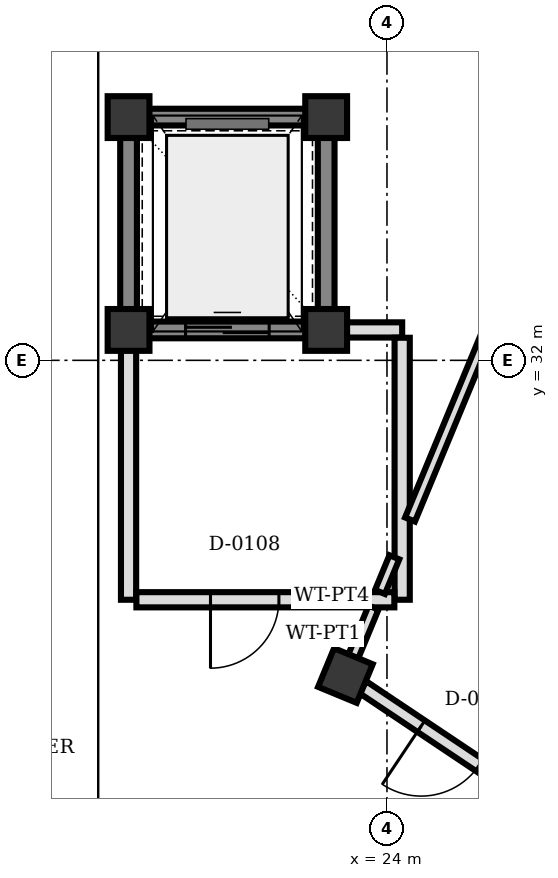
"""IFC4 building model, lengths in metres.
Left out: names, types, materials, properties, quantities, classifications, styles, units other than length and angle.
Written with IfcOpenShell. Run it as: python <this file> out.ifc"""

import sys

from ifc_helpers import new_model, si_unit, direction, frame, frame_2d, origin, origin_2d, place, context, subcontext, project, spatial, rectangle, extrude, element, fill, save


model = new_model("IFC4")
c1 = context("Model", 3, precision=1e-05, world=origin(), true_north=direction((0.0, 1.0)))
c2 = subcontext(c1, "Body", "Model", "MODEL_VIEW")
j1 = project(units=[si_unit("LENGTHUNIT", "METRE"), si_unit("PLANEANGLEUNIT", "RADIAN")], contexts=[c1])
p1 = place(None, origin())
s1 = spatial("IfcSite", under=j1, at=p1, CompositionType="ELEMENT")
p2 = place(p1, origin())
s2 = spatial("IfcBuilding", under=s1, at=p2, CompositionType="ELEMENT")
p3 = place(p2, frame((0.0, 0.0, 12.5)))
s3 = spatial("IfcBuildingStorey", under=s2, at=p3, CompositionType="ELEMENT", Elevation=12.5)
for number, where, z_axis, x_axis in (
    (1, (20.6, 32.4, 0.0), (0.0, 0.0, 1.0), (1.0, 0.0, 0.0)),
    (2, (23.2, 32.4, 0.0), (0.0, 0.0, 1.0), (1.0, 0.0, 0.0)),
    (3, (23.2, 35.2, 0.0), (0.0, 0.0, 1.0), (1.0, 0.0, 0.0)),
    (4, (20.6, 35.2, 0.0), (0.0, 0.0, 1.0), (1.0, 0.0, 0.0)),
):
    element("IfcColumn", number, at=place(p3, frame(where, z_axis=z_axis, x_axis=x_axis)), inside=s3, PredefinedType="COLUMN", context=c2, shape_type="SweptSolid", body=[
        extrude(rectangle(XDim=0.55, YDim=0.55, at=origin_2d()), origin(), (0.0, 0.0, 1.0), 4.0),
    ])
p4 = place(p3, frame((23.453, 27.853, 0.0), z_axis=(0.0, 0.0, 1.0), x_axis=(0.382683432365, 0.923879532511, 0.0)))
e5 = element("IfcColumn", 5, at=p4, inside=s3, PredefinedType="COLUMN", context=c2, shape_type="SweptSolid", body=[
    extrude(rectangle(XDim=0.55, YDim=0.55, at=origin_2d()), origin(), (0.0, 0.0, 1.0), 4.59),
])
p5 = place(p3, frame((20.867, 32.4, 0.0), z_axis=(0.0, 0.0, 1.0), x_axis=(1.0, 0.0, 0.0)))
e6 = element("IfcWall", 6, at=p5, inside=s3, PredefinedType="SHEAR", context=c2, shape_type="SweptSolid", body=[
    extrude(rectangle(XDim=2.066, YDim=0.22, at=frame_2d((1.033, 0.0))), origin(), (0.0, 0.0, 1.0), 3.74),
])
p6 = place(p5, frame((0.483, 0.0, 0.0)))
e7 = element("IfcOpeningElement", 7, at=p6, cuts=e6, PredefinedType="OPENING", context=c2, shape_type="SweptSolid", body=[
    extrude(rectangle(XDim=1.1, YDim=2.15, at=frame_2d((0.55, 1.075))), frame((0.0, 0.12, 0.0), z_axis=(0.0, -1.0, 0.0), x_axis=(1.0, 0.0, 0.0)), (0.0, 0.0, 1.0), 0.24),
])
p7 = place(p3, frame((23.2, 32.667, 0.0), z_axis=(0.0, 0.0, 1.0), x_axis=(0.0, 1.0, 0.0)))
e8 = element("IfcWall", 8, at=p7, inside=s3, PredefinedType="SHEAR", context=c2, shape_type="SweptSolid", body=[
    extrude(rectangle(XDim=2.266, YDim=0.22, at=frame_2d((1.133, 0.0))), origin(), (0.0, 0.0, 1.0), 3.74),
])
p8 = place(p3, frame((22.933, 35.2, 0.0), z_axis=(0.0, 0.0, 1.0), x_axis=(-1.0, 0.0, 0.0)))
e9 = element("IfcWall", 9, at=p8, inside=s3, PredefinedType="SHEAR", context=c2, shape_type="SweptSolid", body=[
    extrude(rectangle(XDim=2.066, YDim=0.22, at=frame_2d((1.033, 0.0))), origin(), (0.0, 0.0, 1.0), 3.74),
])
p9 = place(p3, frame((20.6, 34.933, 0.0), z_axis=(0.0, 0.0, 1.0), x_axis=(0.0, -1.0, 0.0)))
e10 = element("IfcWall", 10, at=p9, inside=s3, PredefinedType="SHEAR", context=c2, shape_type="SweptSolid", body=[
    extrude(rectangle(XDim=2.266, YDim=0.22, at=frame_2d((1.133, 0.0))), origin(), (0.0, 0.0, 1.0), 3.74),
])
p10 = place(p3, frame((23.467, 32.4, 0.0), z_axis=(0.0, 0.0, 1.0), x_axis=(1.0, 0.0, 0.0)))
e11 = element("IfcWall", 11, at=p10, inside=s3, PredefinedType="PARTITIONING", context=c2, shape_type="SweptSolid", body=[
    extrude(rectangle(XDim=0.733, YDim=0.2, at=frame_2d((0.366, 0.0))), origin(), (0.0, 0.0, 1.0), 3.7),
])
p11 = place(p3, frame((20.6, 28.85, 0.0), z_axis=(0.0, 0.0, 1.0), x_axis=(0.0, 1.0, 0.0)))
e12 = element("IfcWall", 12, at=p11, inside=s3, PredefinedType="PARTITIONING", context=c2, shape_type="SweptSolid", body=[
    extrude(rectangle(XDim=3.283, YDim=0.2, at=frame_2d((1.642, 0.0))), origin(), (0.0, 0.0, 1.0), 3.7),
])
p12 = place(p3, frame((24.2, 28.85, 0.0), z_axis=(0.0, 0.0, 1.0), x_axis=(0.0, 1.0, 0.0)))
e13 = element("IfcWall", 13, at=p12, inside=s3, PredefinedType="PARTITIONING", context=c2, shape_type="SweptSolid", body=[
    extrude(rectangle(XDim=3.447, YDim=0.2, at=frame_2d((1.724, 0.0))), origin(), (0.0, 0.0, 1.0), 3.7),
])
p13 = place(p3, frame((24.097, 28.85, 0.0), z_axis=(0.0, 0.0, 1.0), x_axis=(-1.0, 0.0, 0.0)))
e14 = element("IfcWall", 14, at=p13, inside=s3, PredefinedType="PARTITIONING", context=c2, shape_type="SweptSolid", body=[
    extrude(rectangle(XDim=3.394, YDim=0.2, at=frame_2d((1.697, 0.0))), origin(), (0.0, 0.0, 1.0), 3.7),
])
p14 = place(p13, frame((1.519, 0.0, 0.0)))
e15 = element("IfcOpeningElement", 15, at=p14, cuts=e14, PredefinedType="OPENING", context=c2, shape_type="SweptSolid", body=[
    extrude(rectangle(XDim=0.9, YDim=2.2, at=frame_2d((0.45, 1.1))), frame((0.0, 0.11, 0.0), z_axis=(0.0, -1.0, 0.0), x_axis=(1.0, 0.0, 0.0)), (0.0, 0.0, 1.0), 0.22),
])
p15 = place(p3, frame((23.555, 28.1, 0.0), z_axis=(0.0, 0.0, 1.0), x_axis=(0.38278283439, 0.923838352579, 0.0)))
e16 = element("IfcWall", 16, at=p15, inside=s3, PredefinedType="PARTITIONING", context=c2, shape_type="SweptSolid", body=[
    extrude(rectangle(XDim=0.7, YDim=0.14, at=frame_2d((0.35, 0.0))), origin(), (0.0, 0.0, 1.0), 3.7),
])
p16 = place(p3, frame((23.908, 28.953, 0.0), z_axis=(0.0, 0.0, 1.0), x_axis=(0.3827885685, 0.92383597669, 0.0)))
e17 = element("IfcWall", 17, at=p16, inside=s3, PredefinedType="PARTITIONING", context=c2, shape_type="SweptSolid", body=[
    extrude(rectangle(XDim=0.494, YDim=0.14, at=frame_2d((0.247, 0.0))), origin(), (0.0, 0.0, 1.0), 3.7),
])
p17 = place(p3, frame((24.303, 29.906, 0.0), z_axis=(0.0, 0.0, 1.0), x_axis=(0.382682035927, 0.923880110934, 0.0)))
e18 = element("IfcWall", 18, at=p17, inside=s3, PredefinedType="PARTITIONING", context=c2, shape_type="SweptSolid", body=[
    extrude(rectangle(XDim=6.486, YDim=0.14, at=frame_2d((3.243, 0.0))), origin(), (0.0, 0.0, 1.0), 3.7),
])
p18 = place(p3, frame((25.984, 26.161, 0.0), z_axis=(0.0, 0.0, 1.0), x_axis=(-0.831318045056, 0.555797002478, 0.0)))
e19 = element("IfcWall", 19, at=p18, inside=s3, PredefinedType="PARTITIONING", context=c2, shape_type="SweptSolid", body=[
    extrude(rectangle(XDim=2.773, YDim=0.18, at=frame_2d((1.386, 0.0))), origin(), (0.0, 0.0, 1.0), 3.7),
])
p19 = place(p18, frame((0.926, 0.0, 0.0)))
e20 = element("IfcOpeningElement", 20, at=p19, cuts=e19, PredefinedType="OPENING", context=c2, shape_type="SweptSolid", body=[
    extrude(rectangle(XDim=0.92, YDim=2.1, at=frame_2d((0.46, 1.05))), frame((0.0, 0.1, 0.0), z_axis=(0.0, -1.0, 0.0), x_axis=(1.0, 0.0, 0.0)), (0.0, 0.0, 1.0), 0.2),
])
p20 = place(p6, origin())
e21 = element("IfcDoor", 21, at=p20, inside=s3, OperationType="DOUBLE_DOOR_SLIDING", PredefinedType="DOOR", context=c2, shape_type="SweptSolid", body=[
    extrude(rectangle(XDim=1.1, YDim=2.15, at=frame_2d((0.55, 1.075))), frame((0.0, 0.025, 0.0), z_axis=(0.0, -1.0, 0.0), x_axis=(1.0, 0.0, 0.0)), (0.0, 0.0, 1.0), 0.05),
])
fill(e7, e21)
p21 = place(p14, origin())
e22 = element("IfcDoor", 22, at=p21, inside=s3, OperationType="SINGLE_SWING_RIGHT", PredefinedType="DOOR", context=c2, shape_type="SweptSolid", body=[
    extrude(rectangle(XDim=0.9, YDim=2.2, at=frame_2d((0.45, 1.1))), frame((0.0, 0.025, 0.0), z_axis=(0.0, -1.0, 0.0), x_axis=(1.0, 0.0, 0.0)), (0.0, 0.0, 1.0), 0.05),
])
fill(e15, e22)
p22 = place(p19, origin())
e23 = element("IfcDoor", 23, at=p22, inside=s3, OperationType="SINGLE_SWING_RIGHT", PredefinedType="DOOR", context=c2, shape_type="SweptSolid", body=[
    extrude(rectangle(XDim=0.92, YDim=2.1, at=frame_2d((0.46, 1.05))), frame((0.0, 0.025, 0.0), z_axis=(0.0, -1.0, 0.0), x_axis=(1.0, 0.0, 0.0)), (0.0, 0.0, 1.0), 0.05),
])
fill(e20, e23)
save(model, sys.argv[1])
